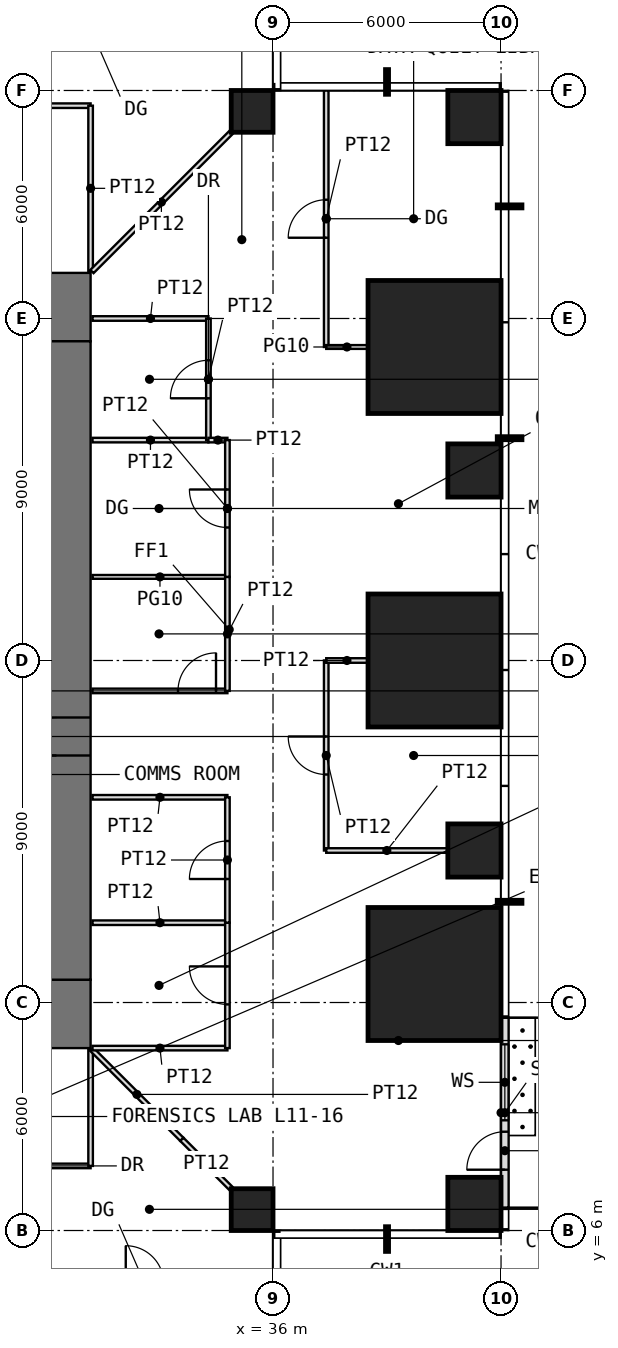
"""IFC4 building model, lengths in metres.
Left out: names, types, materials, properties, quantities, classifications, styles, units other than length and angle.
Written with IfcOpenShell. Run it as: python <this file> out.ifc"""

import sys

from ifc_helpers import new_model, si_unit, direction, frame, frame_2d, origin, origin_2d, place, context, subcontext, project, spatial, rectangle, extrude, element, fill, save


model = new_model("IFC4")
c1 = context("Model", 3, precision=1e-05, world=origin(), true_north=direction((0.0, 1.0)))
c2 = subcontext(c1, "Body", "Model", "MODEL_VIEW")
j1 = project(units=[si_unit("LENGTHUNIT", "METRE"), si_unit("PLANEANGLEUNIT", "RADIAN")], contexts=[c1])
p1 = place(None, origin())
s1 = spatial("IfcSite", under=j1, at=p1, CompositionType="ELEMENT")
p2 = place(p1, origin())
s2 = spatial("IfcBuilding", under=s1, at=p2, CompositionType="ELEMENT")
p3 = place(p2, frame((0.0, 0.0, 50.5)))
s3 = spatial("IfcBuildingStorey", under=s2, at=p3, CompositionType="ELEMENT", Elevation=50.5)
p4 = place(p3, frame((35.45, 6.55, 0.0), z_axis=(0.0, 0.0, 1.0), x_axis=(1.0, 0.0, 0.0)))
e1 = element("IfcColumn", 1, at=p4, inside=s3, PredefinedType="COLUMN", context=c2, shape_type="SweptSolid", body=[
    extrude(rectangle(XDim=1.1, YDim=1.1, at=origin_2d()), origin(), (0.0, 0.0, 1.0), 4.0),
])
p5 = place(p3, frame((41.3, 6.7, 0.0), z_axis=(0.0, 0.0, 1.0), x_axis=(1.0, 0.0, 0.0)))
e2 = element("IfcColumn", 2, at=p5, inside=s3, PredefinedType="COLUMN", context=c2, shape_type="SweptSolid", body=[
    extrude(rectangle(XDim=1.4, YDim=1.4, at=origin_2d()), origin(), (0.0, 0.0, 1.0), 4.0),
])
p6 = place(p3, frame((40.25, 12.75, 0.0), z_axis=(0.0, 0.0, 1.0), x_axis=(1.0, 0.0, 0.0)))
e3 = element("IfcColumn", 3, at=p6, inside=s3, PredefinedType="COLUMN", context=c2, shape_type="SweptSolid", body=[
    extrude(rectangle(XDim=3.5, YDim=3.5, at=origin_2d()), origin(), (0.0, 0.0, 1.0), 4.0),
])
p7 = place(p3, frame((41.3, 16.0, 0.0), z_axis=(0.0, 0.0, 1.0), x_axis=(1.0, 0.0, 0.0)))
e4 = element("IfcColumn", 4, at=p7, inside=s3, PredefinedType="COLUMN", context=c2, shape_type="SweptSolid", body=[
    extrude(rectangle(XDim=1.4, YDim=1.4, at=origin_2d()), origin(), (0.0, 0.0, 1.0), 4.0),
])
p8 = place(p3, frame((40.25, 21.0, 0.0), z_axis=(0.0, 0.0, 1.0), x_axis=(1.0, 0.0, 0.0)))
e5 = element("IfcColumn", 5, at=p8, inside=s3, PredefinedType="COLUMN", context=c2, shape_type="SweptSolid", body=[
    extrude(rectangle(XDim=3.5, YDim=3.5, at=origin_2d()), origin(), (0.0, 0.0, 1.0), 4.0),
])
p9 = place(p3, frame((41.3, 26.0, 0.0), z_axis=(0.0, 0.0, 1.0), x_axis=(1.0, 0.0, 0.0)))
e6 = element("IfcColumn", 6, at=p9, inside=s3, PredefinedType="COLUMN", context=c2, shape_type="SweptSolid", body=[
    extrude(rectangle(XDim=1.4, YDim=1.4, at=origin_2d()), origin(), (0.0, 0.0, 1.0), 4.0),
])
p10 = place(p3, frame((40.25, 29.25, 0.0), z_axis=(0.0, 0.0, 1.0), x_axis=(1.0, 0.0, 0.0)))
e7 = element("IfcColumn", 7, at=p10, inside=s3, PredefinedType="COLUMN", context=c2, shape_type="SweptSolid", body=[
    extrude(rectangle(XDim=3.5, YDim=3.5, at=origin_2d()), origin(), (0.0, 0.0, 1.0), 4.0),
])
p11 = place(p3, frame((35.45, 35.45, 0.0), z_axis=(0.0, 0.0, 1.0), x_axis=(1.0, 0.0, 0.0)))
e8 = element("IfcColumn", 8, at=p11, inside=s3, PredefinedType="COLUMN", context=c2, shape_type="SweptSolid", body=[
    extrude(rectangle(XDim=1.1, YDim=1.1, at=origin_2d()), origin(), (0.0, 0.0, 1.0), 4.0),
])
p12 = place(p3, frame((41.3, 35.3, 0.0), z_axis=(0.0, 0.0, 1.0), x_axis=(1.0, 0.0, 0.0)))
e9 = element("IfcColumn", 9, at=p12, inside=s3, PredefinedType="COLUMN", context=c2, shape_type="SweptSolid", body=[
    extrude(rectangle(XDim=1.4, YDim=1.4, at=origin_2d()), origin(), (0.0, 0.0, 1.0), 4.0),
])
p13 = place(p3, frame((42.1, 6.6, 0.0), z_axis=(0.0, 0.0, 1.0), x_axis=(0.0, 1.0, 0.0)))
e10 = element("IfcWall", 10, at=p13, inside=s3, PredefinedType="USERDEFINED", context=c2, shape_type="SweptSolid", body=[
    extrude(rectangle(XDim=5.0, YDim=0.2, at=frame_2d((2.5, 0.0))), origin(), (0.0, 0.0, 1.0), 3.75),
])
p14 = place(p13, frame((1.0, 0.0, 0.0)))
e11 = element("IfcOpeningElement", 11, at=p14, cuts=e10, PredefinedType="OPENING", context=c2, shape_type="SweptSolid", body=[
    extrude(rectangle(XDim=1.0, YDim=2.4, at=frame_2d((0.5, 1.2))), frame((0.0, 0.11, 0.0), z_axis=(0.0, -1.0, 0.0), x_axis=(1.0, 0.0, 0.0)), (0.0, 0.0, 1.0), 0.22),
])
p15 = place(p13, frame((2.3, 0.0, 0.3)))
e12 = element("IfcOpeningElement", 12, at=p15, cuts=e10, PredefinedType="OPENING", context=c2, shape_type="SweptSolid", body=[
    extrude(rectangle(XDim=2.0, YDim=2.7, at=frame_2d((1.0, 1.35))), frame((0.0, 0.11, 0.0), z_axis=(0.0, -1.0, 0.0), x_axis=(1.0, 0.0, 0.0)), (0.0, 0.0, 1.0), 0.22),
])
p16 = place(p3, frame((10.8, 11.7, -0.05), z_axis=(0.0, 0.0, 1.0), x_axis=(1.0, 0.0, 0.0)))
e13 = element("IfcWall", 13, at=p16, inside=s3, PredefinedType="SHEAR", context=c2, shape_type="SweptSolid", body=[
    extrude(rectangle(XDim=20.4, YDim=1.8, at=frame_2d((10.2, 0.0))), origin(), (0.0, 0.0, 1.0), 4.0),
])
p17 = place(p16, frame((9.2, 0.0, 0.05)))
e14 = element("IfcOpeningElement", 14, at=p17, cuts=e13, PredefinedType="OPENING", context=c2, shape_type="SweptSolid", body=[
    extrude(rectangle(XDim=2.0, YDim=2.2, at=frame_2d((1.0, 1.1))), frame((0.0, 0.91, 0.0), z_axis=(0.0, -1.0, 0.0), x_axis=(1.0, 0.0, 0.0)), (0.0, 0.0, 1.0), 1.82),
])
p18 = place(p3, frame((10.8, 30.3, -0.05), z_axis=(0.0, 0.0, 1.0), x_axis=(1.0, 0.0, 0.0)))
e15 = element("IfcWall", 15, at=p18, inside=s3, PredefinedType="SHEAR", context=c2, shape_type="SweptSolid", body=[
    extrude(rectangle(XDim=20.4, YDim=1.8, at=frame_2d((10.2, 0.0))), origin(), (0.0, 0.0, 1.0), 4.0),
])
p19 = place(p18, frame((9.2, 0.0, 0.05)))
e16 = element("IfcOpeningElement", 16, at=p19, cuts=e15, PredefinedType="OPENING", context=c2, shape_type="SweptSolid", body=[
    extrude(rectangle(XDim=2.0, YDim=2.2, at=frame_2d((1.0, 1.1))), frame((0.0, 0.91, 0.0), z_axis=(0.0, -1.0, 0.0), x_axis=(1.0, 0.0, 0.0)), (0.0, 0.0, 1.0), 1.82),
])
p20 = place(p3, frame((30.3, 12.6, -0.05), z_axis=(0.0, 0.0, 1.0), x_axis=(0.0, 1.0, 0.0)))
e17 = element("IfcWall", 17, at=p20, inside=s3, PredefinedType="SHEAR", context=c2, shape_type="SweptSolid", body=[
    extrude(rectangle(XDim=16.8, YDim=1.8, at=frame_2d((8.4, 0.0))), origin(), (0.0, 0.0, 1.0), 4.0),
])
p21 = place(p20, frame((5.9, 0.0, 0.05)))
e18 = element("IfcOpeningElement", 18, at=p21, cuts=e17, PredefinedType="OPENING", context=c2, shape_type="SweptSolid", body=[
    extrude(rectangle(XDim=1.0, YDim=2.2, at=frame_2d((0.5, 1.1))), frame((0.0, 0.91, 0.0), z_axis=(0.0, -1.0, 0.0), x_axis=(1.0, 0.0, 0.0)), (0.0, 0.0, 1.0), 1.82),
])
p22 = place(p3, frame((23.6, 35.6, 0.0), z_axis=(0.0, 0.0, 1.0), x_axis=(1.0, 0.0, 0.0)))
e19 = element("IfcWall", 19, at=p22, inside=s3, PredefinedType="PARTITIONING", context=c2, shape_type="SweptSolid", body=[
    extrude(rectangle(XDim=7.6, YDim=0.12, at=frame_2d((3.8, 0.0))), origin(), (0.0, 0.0, 1.0), 3.75),
])
p23 = place(p22, frame((3.3, 0.0, 0.0)))
e20 = element("IfcOpeningElement", 20, at=p23, cuts=e19, PredefinedType="OPENING", context=c2, shape_type="SweptSolid", body=[
    extrude(rectangle(XDim=1.0, YDim=2.4, at=frame_2d((0.5, 1.2))), frame((0.0, 0.07, 0.0), z_axis=(0.0, -1.0, 0.0), x_axis=(1.0, 0.0, 0.0)), (0.0, 0.0, 1.0), 0.14),
])
p24 = place(p3, frame((27.6, 7.7, 0.0), z_axis=(0.0, 0.0, 1.0), x_axis=(1.0, 0.0, 0.0)))
e21 = element("IfcWall", 21, at=p24, inside=s3, PredefinedType="PARTITIONING", context=c2, shape_type="SweptSolid", body=[
    extrude(rectangle(XDim=3.6, YDim=0.12, at=frame_2d((1.8, 0.0))), origin(), (0.0, 0.0, 1.0), 3.75),
])
p25 = place(p24, frame((1.3, 0.0, 0.0)))
e22 = element("IfcOpeningElement", 22, at=p25, cuts=e21, PredefinedType="OPENING", context=c2, shape_type="SweptSolid", body=[
    extrude(rectangle(XDim=1.0, YDim=2.2, at=frame_2d((0.5, 1.1))), frame((0.0, 0.07, 0.0), z_axis=(0.0, -1.0, 0.0), x_axis=(1.0, 0.0, 0.0)), (0.0, 0.0, 1.0), 0.14),
])
p26 = place(p3, frame((31.2, 7.7, 0.0), z_axis=(0.0, 0.0, 1.0), x_axis=(0.0, 1.0, 0.0)))
e23 = element("IfcWall", 23, at=p26, inside=s3, PredefinedType="PARTITIONING", context=c2, shape_type="SweptSolid", body=[
    extrude(rectangle(XDim=3.05, YDim=0.12, at=frame_2d((1.525, 0.0))), origin(), (0.0, 0.0, 1.0), 3.75),
])
p27 = place(p3, frame((31.2, 31.25, 0.0), z_axis=(0.0, 0.0, 1.0), x_axis=(0.0, 1.0, 0.0)))
e24 = element("IfcWall", 24, at=p27, inside=s3, PredefinedType="PARTITIONING", context=c2, shape_type="SweptSolid", body=[
    extrude(rectangle(XDim=4.35, YDim=0.12, at=frame_2d((2.175, 0.0))), origin(), (0.0, 0.0, 1.0), 3.75),
])
p28 = place(p3, frame((31.235, 10.765, 0.0), z_axis=(0.0, 0.0, 1.0), x_axis=(0.707106781187, -0.707106781187, 0.0)))
e25 = element("IfcWall", 25, at=p28, inside=s3, PredefinedType="PARTITIONING", context=c2, shape_type="SweptSolid", body=[
    extrude(rectangle(XDim=3.346, YDim=0.12, at=frame_2d((1.673, 0.0))), origin(), (0.0, 0.0, 1.0), 3.75),
])
p29 = place(p3, frame((31.235, 31.235, 0.0), z_axis=(0.0, 0.0, 1.0), x_axis=(0.707106781187, 0.707106781187, 0.0)))
e26 = element("IfcWall", 26, at=p29, inside=s3, PredefinedType="PARTITIONING", context=c2, shape_type="SweptSolid", body=[
    extrude(rectangle(XDim=5.168, YDim=0.12, at=frame_2d((2.584, 0.0))), origin(), (0.0, 0.0, 1.0), 3.75),
])
for number, where, z_axis, x_axis in (
    (27, (31.25, 10.8, 0.0), (0.0, 0.0, 1.0), (1.0, 0.0, 0.0)),
    (28, (31.25, 14.1, 0.0), (0.0, 0.0, 1.0), (1.0, 0.0, 0.0)),
    (29, (31.25, 17.4, 0.0), (0.0, 0.0, 1.0), (1.0, 0.0, 0.0)),
):
    element("IfcWall", number, at=place(p3, frame(where, z_axis=z_axis, x_axis=x_axis)), inside=s3, PredefinedType="PARTITIONING", context=c2, shape_type="SweptSolid", body=[
        extrude(rectangle(XDim=3.55, YDim=0.12, at=frame_2d((1.775, 0.0))), origin(), (0.0, 0.0, 1.0), 3.75),
    ])
p30 = place(p3, frame((31.25, 20.2, 0.0), z_axis=(0.0, 0.0, 1.0), x_axis=(1.0, 0.0, 0.0)))
e30 = element("IfcWall", 30, at=p30, inside=s3, PredefinedType="PARTITIONING", context=c2, shape_type="SweptSolid", body=[
    extrude(rectangle(XDim=3.55, YDim=0.12, at=frame_2d((1.775, 0.0))), origin(), (0.0, 0.0, 1.0), 3.75),
])
p31 = place(p30, frame((2.25, 0.0, 0.0)))
e31 = element("IfcOpeningElement", 31, at=p31, cuts=e30, PredefinedType="OPENING", context=c2, shape_type="SweptSolid", body=[
    extrude(rectangle(XDim=1.0, YDim=2.4, at=frame_2d((0.5, 1.2))), frame((0.0, 0.07, 0.0), z_axis=(0.0, -1.0, 0.0), x_axis=(1.0, 0.0, 0.0)), (0.0, 0.0, 1.0), 0.14),
])
p32 = place(p3, frame((31.25, 23.2, 0.0), z_axis=(0.0, 0.0, 1.0), x_axis=(1.0, 0.0, 0.0)))
e32 = element("IfcWall", 32, at=p32, inside=s3, PredefinedType="PARTITIONING", context=c2, shape_type="SweptSolid", body=[
    extrude(rectangle(XDim=3.55, YDim=0.1, at=frame_2d((1.775, 0.0))), origin(), (0.0, 0.0, 1.0), 3.75),
])
for number, where, z_axis, x_axis in (
    (33, (31.25, 26.8, 0.0), (0.0, 0.0, 1.0), (1.0, 0.0, 0.0)),
    (34, (31.25, 30.0, 0.0), (0.0, 0.0, 1.0), (1.0, 0.0, 0.0)),
):
    element("IfcWall", number, at=place(p3, frame(where, z_axis=z_axis, x_axis=x_axis)), inside=s3, PredefinedType="PARTITIONING", context=c2, shape_type="SweptSolid", body=[
        extrude(rectangle(XDim=3.05, YDim=0.12, at=frame_2d((1.525, 0.0))), origin(), (0.0, 0.0, 1.0), 3.75),
    ])
p33 = place(p3, frame((33.602, 8.398, 0.0), z_axis=(0.0, 0.0, 1.0), x_axis=(0.707106781187, -0.707106781187, 0.0)))
e35 = element("IfcWall", 35, at=p33, inside=s3, PredefinedType="PARTITIONING", context=c2, shape_type="SweptSolid", body=[
    extrude(rectangle(XDim=1.822, YDim=0.12, at=frame_2d((0.911, 0.0))), origin(), (0.0, 0.0, 1.0), 3.75),
])
p34 = place(p3, frame((34.3, 26.8, 0.0), z_axis=(0.0, 0.0, 1.0), x_axis=(0.0, 1.0, 0.0)))
e36 = element("IfcWall", 36, at=p34, inside=s3, PredefinedType="PARTITIONING", context=c2, shape_type="SweptSolid", body=[
    extrude(rectangle(XDim=3.2, YDim=0.12, at=frame_2d((1.6, 0.0))), origin(), (0.0, 0.0, 1.0), 3.75),
])
p35 = place(p34, frame((1.1, 0.0, 0.0)))
e37 = element("IfcOpeningElement", 37, at=p35, cuts=e36, PredefinedType="OPENING", context=c2, shape_type="SweptSolid", body=[
    extrude(rectangle(XDim=1.0, YDim=2.2, at=frame_2d((0.5, 1.1))), frame((0.0, 0.07, 0.0), z_axis=(0.0, -1.0, 0.0), x_axis=(1.0, 0.0, 0.0)), (0.0, 0.0, 1.0), 0.14),
])
p36 = place(p3, frame((34.3, 26.8, 0.0), z_axis=(0.0, 0.0, 1.0), x_axis=(1.0, 0.0, 0.0)))
e38 = element("IfcWall", 38, at=p36, inside=s3, PredefinedType="PARTITIONING", context=c2, shape_type="SweptSolid", body=[
    extrude(rectangle(XDim=0.5, YDim=0.12, at=frame_2d((0.25, 0.0))), origin(), (0.0, 0.0, 1.0), 3.75),
])
p37 = place(p3, frame((34.8, 10.8, 0.0), z_axis=(0.0, 0.0, 1.0), x_axis=(0.0, 1.0, 0.0)))
e39 = element("IfcWall", 39, at=p37, inside=s3, PredefinedType="PARTITIONING", context=c2, shape_type="SweptSolid", body=[
    extrude(rectangle(XDim=3.3, YDim=0.12, at=frame_2d((1.65, 0.0))), origin(), (0.0, 0.0, 1.0), 3.75),
])
p38 = place(p37, frame((1.15, 0.0, 0.0)))
e40 = element("IfcOpeningElement", 40, at=p38, cuts=e39, PredefinedType="OPENING", context=c2, shape_type="SweptSolid", body=[
    extrude(rectangle(XDim=1.0, YDim=2.2, at=frame_2d((0.5, 1.1))), frame((0.0, 0.07, 0.0), z_axis=(0.0, -1.0, 0.0), x_axis=(1.0, 0.0, 0.0)), (0.0, 0.0, 1.0), 0.14),
])
p39 = place(p3, frame((34.8, 14.1, 0.0), z_axis=(0.0, 0.0, 1.0), x_axis=(0.0, 1.0, 0.0)))
e41 = element("IfcWall", 41, at=p39, inside=s3, PredefinedType="PARTITIONING", context=c2, shape_type="SweptSolid", body=[
    extrude(rectangle(XDim=3.3, YDim=0.12, at=frame_2d((1.65, 0.0))), origin(), (0.0, 0.0, 1.0), 3.75),
])
p40 = place(p39, frame((1.15, 0.0, 0.0)))
e42 = element("IfcOpeningElement", 42, at=p40, cuts=e41, PredefinedType="OPENING", context=c2, shape_type="SweptSolid", body=[
    extrude(rectangle(XDim=1.0, YDim=2.2, at=frame_2d((0.5, 1.1))), frame((0.0, 0.07, 0.0), z_axis=(0.0, -1.0, 0.0), x_axis=(1.0, 0.0, 0.0)), (0.0, 0.0, 1.0), 0.14),
])
p41 = place(p3, frame((34.8, 20.2, 0.0), z_axis=(0.0, 0.0, 1.0), x_axis=(0.0, 1.0, 0.0)))
e43 = element("IfcWall", 43, at=p41, inside=s3, PredefinedType="PARTITIONING", context=c2, shape_type="SweptSolid", body=[
    extrude(rectangle(XDim=3.0, YDim=0.12, at=frame_2d((1.5, 0.0))), origin(), (0.0, 0.0, 1.0), 3.75),
])
p42 = place(p3, frame((34.8, 23.2, 0.0), z_axis=(0.0, 0.0, 1.0), x_axis=(0.0, 1.0, 0.0)))
e44 = element("IfcWall", 44, at=p42, inside=s3, PredefinedType="PARTITIONING", context=c2, shape_type="SweptSolid", body=[
    extrude(rectangle(XDim=3.6, YDim=0.12, at=frame_2d((1.8, 0.0))), origin(), (0.0, 0.0, 1.0), 3.75),
])
p43 = place(p42, frame((1.3, 0.0, 0.0)))
e45 = element("IfcOpeningElement", 45, at=p43, cuts=e44, PredefinedType="OPENING", context=c2, shape_type="SweptSolid", body=[
    extrude(rectangle(XDim=1.0, YDim=2.4, at=frame_2d((0.5, 1.2))), frame((0.0, 0.07, 0.0), z_axis=(0.0, -1.0, 0.0), x_axis=(1.0, 0.0, 0.0)), (0.0, 0.0, 1.0), 0.14),
])
p44 = place(p3, frame((37.4, 16.0, 0.0), z_axis=(0.0, 0.0, 1.0), x_axis=(0.0, 1.0, 0.0)))
e46 = element("IfcWall", 46, at=p44, inside=s3, PredefinedType="PARTITIONING", context=c2, shape_type="SweptSolid", body=[
    extrude(rectangle(XDim=5.0, YDim=0.12, at=frame_2d((2.5, 0.0))), origin(), (0.0, 0.0, 1.0), 3.75),
])
p45 = place(p44, frame((2.0, 0.0, 0.0)))
e47 = element("IfcOpeningElement", 47, at=p45, cuts=e46, PredefinedType="OPENING", context=c2, shape_type="SweptSolid", body=[
    extrude(rectangle(XDim=1.0, YDim=2.2, at=frame_2d((0.5, 1.1))), frame((0.0, 0.07, 0.0), z_axis=(0.0, -1.0, 0.0), x_axis=(1.0, 0.0, 0.0)), (0.0, 0.0, 1.0), 0.14),
])
p46 = place(p3, frame((37.4, 16.0, 0.0), z_axis=(0.0, 0.0, 1.0), x_axis=(1.0, 0.0, 0.0)))
e48 = element("IfcWall", 48, at=p46, inside=s3, PredefinedType="PARTITIONING", context=c2, shape_type="SweptSolid", body=[
    extrude(rectangle(XDim=3.19, YDim=0.12, at=frame_2d((1.595, 0.0))), origin(), (0.0, 0.0, 1.0), 3.75),
])
p47 = place(p3, frame((37.4, 21.0, 0.0), z_axis=(0.0, 0.0, 1.0), x_axis=(1.0, 0.0, 0.0)))
e49 = element("IfcWall", 49, at=p47, inside=s3, PredefinedType="PARTITIONING", context=c2, shape_type="SweptSolid", body=[
    extrude(rectangle(XDim=1.09, YDim=0.12, at=frame_2d((0.545, 0.0))), origin(), (0.0, 0.0, 1.0), 3.75),
])
p48 = place(p3, frame((37.4, 29.25, 0.0), z_axis=(0.0, 0.0, 1.0), x_axis=(0.0, 1.0, 0.0)))
e50 = element("IfcWall", 50, at=p48, inside=s3, PredefinedType="PARTITIONING", context=c2, shape_type="SweptSolid", body=[
    extrude(rectangle(XDim=6.75, YDim=0.12, at=frame_2d((3.375, 0.0))), origin(), (0.0, 0.0, 1.0), 3.75),
])
p49 = place(p48, frame((2.875, 0.0, 0.0)))
e51 = element("IfcOpeningElement", 51, at=p49, cuts=e50, PredefinedType="OPENING", context=c2, shape_type="SweptSolid", body=[
    extrude(rectangle(XDim=1.0, YDim=2.4, at=frame_2d((0.5, 1.2))), frame((0.0, 0.07, 0.0), z_axis=(0.0, -1.0, 0.0), x_axis=(1.0, 0.0, 0.0)), (0.0, 0.0, 1.0), 0.14),
])
p50 = place(p3, frame((37.4, 29.25, 0.0), z_axis=(0.0, 0.0, 1.0), x_axis=(1.0, 0.0, 0.0)))
e52 = element("IfcWall", 52, at=p50, inside=s3, PredefinedType="PARTITIONING", context=c2, shape_type="SweptSolid", body=[
    extrude(rectangle(XDim=1.09, YDim=0.1, at=frame_2d((0.545, 0.0))), origin(), (0.0, 0.0, 1.0), 3.75),
])
p51 = place(p14, origin())
e53 = element("IfcDoor", 53, at=p51, inside=s3, OperationType="SINGLE_SWING_LEFT", PredefinedType="DOOR", context=c2, shape_type="SweptSolid", body=[
    extrude(rectangle(XDim=1.0, YDim=2.4, at=frame_2d((0.5, 1.2))), frame((0.0, 0.025, 0.0), z_axis=(0.0, -1.0, 0.0), x_axis=(1.0, 0.0, 0.0)), (0.0, 0.0, 1.0), 0.05),
])
fill(e11, e53)
p52 = place(p15, origin())
e54 = element("IfcWindow", 54, at=p52, inside=s3, PartitioningType="SINGLE_PANEL", PredefinedType="WINDOW", context=c2, shape_type="SweptSolid", body=[
    extrude(rectangle(XDim=2.0, YDim=2.7, at=frame_2d((1.0, 1.35))), frame((0.0, 0.03, 0.0), z_axis=(0.0, -1.0, 0.0), x_axis=(1.0, 0.0, 0.0)), (0.0, 0.0, 1.0), 0.06),
])
fill(e12, e54)
p53 = place(p21, origin())
e55 = element("IfcDoor", 55, at=p53, inside=s3, OperationType="SINGLE_SWING_LEFT", PredefinedType="DOOR", context=c2, shape_type="SweptSolid", body=[
    extrude(rectangle(XDim=1.0, YDim=2.2, at=frame_2d((0.5, 1.1))), frame((0.0, 0.025, 0.0), z_axis=(0.0, -1.0, 0.0), x_axis=(1.0, 0.0, 0.0)), (0.0, 0.0, 1.0), 0.05),
])
fill(e18, e55)
p54 = place(p38, origin())
e56 = element("IfcDoor", 56, at=p54, inside=s3, OperationType="SINGLE_SWING_RIGHT", PredefinedType="DOOR", context=c2, shape_type="SweptSolid", body=[
    extrude(rectangle(XDim=1.0, YDim=2.2, at=frame_2d((0.5, 1.1))), frame((0.0, 0.025, 0.0), z_axis=(0.0, -1.0, 0.0), x_axis=(1.0, 0.0, 0.0)), (0.0, 0.0, 1.0), 0.05),
])
fill(e40, e56)
p55 = place(p40, origin())
e57 = element("IfcDoor", 57, at=p55, inside=s3, OperationType="SINGLE_SWING_LEFT", PredefinedType="DOOR", context=c2, shape_type="SweptSolid", body=[
    extrude(rectangle(XDim=1.0, YDim=2.2, at=frame_2d((0.5, 1.1))), frame((0.0, 0.025, 0.0), z_axis=(0.0, -1.0, 0.0), x_axis=(1.0, 0.0, 0.0)), (0.0, 0.0, 1.0), 0.05),
])
fill(e42, e57)
p56 = place(p43, origin())
e58 = element("IfcDoor", 58, at=p56, inside=s3, OperationType="SINGLE_SWING_RIGHT", PredefinedType="DOOR", context=c2, shape_type="SweptSolid", body=[
    extrude(rectangle(XDim=1.0, YDim=2.4, at=frame_2d((0.5, 1.2))), frame((0.0, 0.025, 0.0), z_axis=(0.0, -1.0, 0.0), x_axis=(1.0, 0.0, 0.0)), (0.0, 0.0, 1.0), 0.05),
])
fill(e45, e58)
p57 = place(p35, origin())
e59 = element("IfcDoor", 59, at=p57, inside=s3, OperationType="SINGLE_SWING_LEFT", PredefinedType="DOOR", context=c2, shape_type="SweptSolid", body=[
    extrude(rectangle(XDim=1.0, YDim=2.2, at=frame_2d((0.5, 1.1))), frame((0.0, 0.025, 0.0), z_axis=(0.0, -1.0, 0.0), x_axis=(1.0, 0.0, 0.0)), (0.0, 0.0, 1.0), 0.05),
])
fill(e37, e59)
p58 = place(p45, origin())
e60 = element("IfcDoor", 60, at=p58, inside=s3, OperationType="SINGLE_SWING_RIGHT", PredefinedType="DOOR", context=c2, shape_type="SweptSolid", body=[
    extrude(rectangle(XDim=1.0, YDim=2.2, at=frame_2d((0.5, 1.1))), frame((0.0, 0.025, 0.0), z_axis=(0.0, -1.0, 0.0), x_axis=(1.0, 0.0, 0.0)), (0.0, 0.0, 1.0), 0.05),
])
fill(e47, e60)
p59 = place(p49, origin())
e61 = element("IfcDoor", 61, at=p59, inside=s3, OperationType="SINGLE_SWING_LEFT", PredefinedType="DOOR", context=c2, shape_type="SweptSolid", body=[
    extrude(rectangle(XDim=1.0, YDim=2.4, at=frame_2d((0.5, 1.2))), frame((0.0, 0.025, 0.0), z_axis=(0.0, -1.0, 0.0), x_axis=(1.0, 0.0, 0.0)), (0.0, 0.0, 1.0), 0.05),
])
fill(e51, e61)
p60 = place(p31, origin())
e62 = element("IfcDoor", 62, at=p60, inside=s3, OperationType="SINGLE_SWING_RIGHT", PredefinedType="DOOR", context=c2, shape_type="SweptSolid", body=[
    extrude(rectangle(XDim=1.0, YDim=2.4, at=frame_2d((0.5, 1.2))), frame((0.0, 0.025, 0.0), z_axis=(0.0, -1.0, 0.0), x_axis=(1.0, 0.0, 0.0)), (0.0, 0.0, 1.0), 0.05),
])
fill(e31, e62)
save(model, sys.argv[1])
